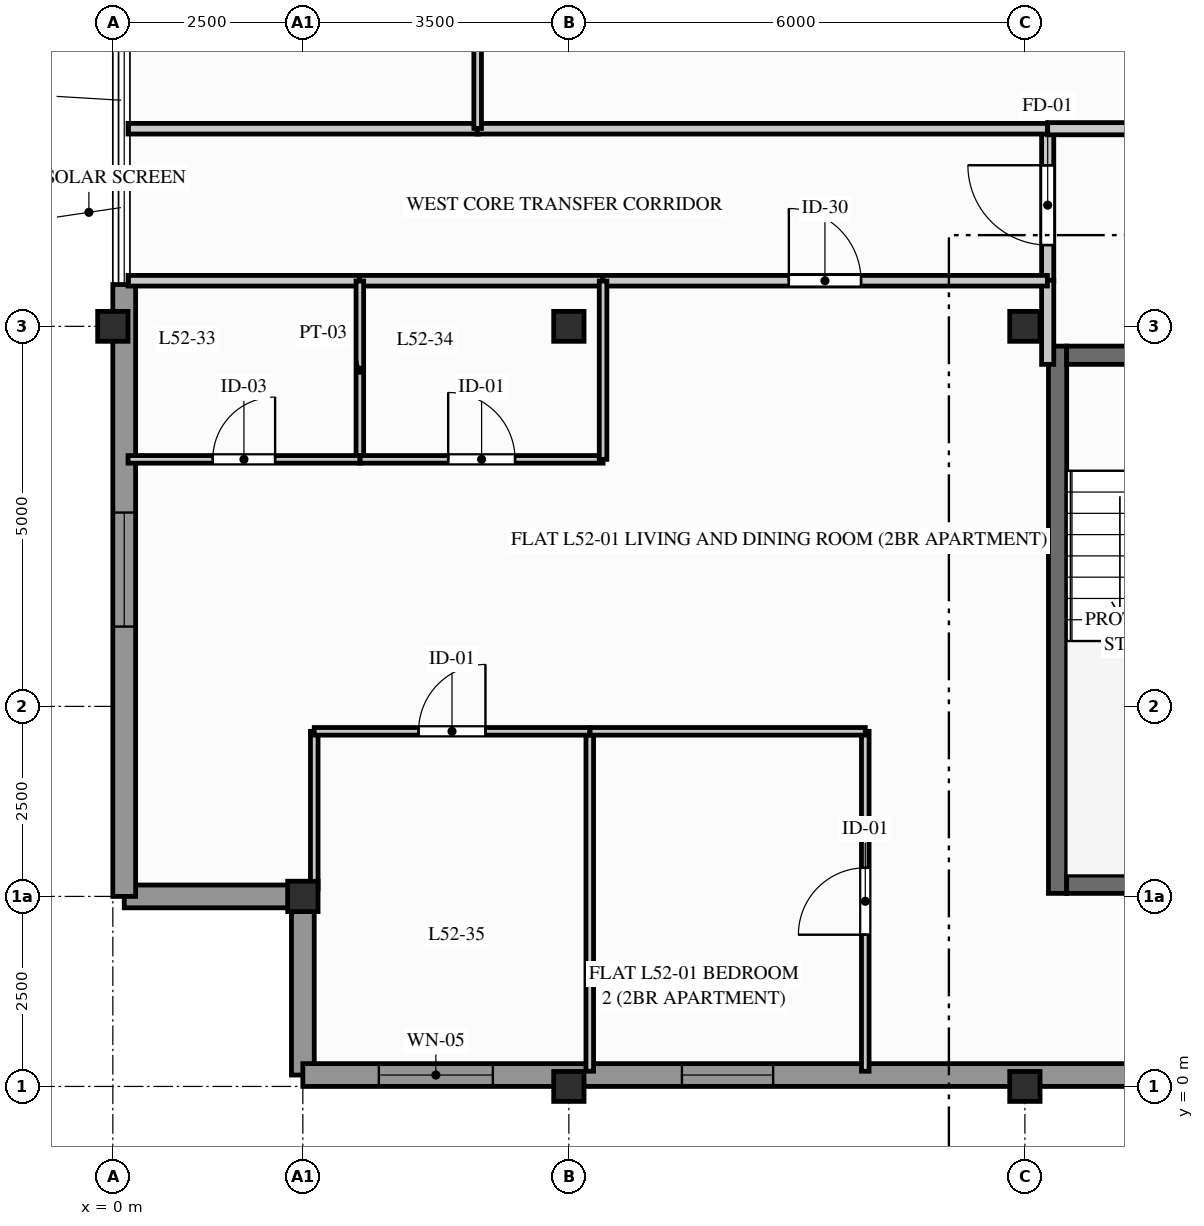
"""IFC4 building model, lengths in metres.
Left out: names, types, materials, properties, quantities, classifications, styles, units other than length and angle.
Written with IfcOpenShell. Run it as: python <this file> out.ifc"""

import sys

from ifc_helpers import new_model, si_unit, direction, frame, frame_2d, origin, origin_2d, place, context, subcontext, project, spatial, rectangle, hollow_rectangle, i_section, extrude, element, fill, save


model = new_model("IFC4")
c1 = context("Model", 3, precision=1e-05, world=origin(), true_north=direction((0.0, 1.0)))
c2 = subcontext(c1, "Body", "Model", "MODEL_VIEW")
j1 = project(units=[si_unit("LENGTHUNIT", "METRE"), si_unit("PLANEANGLEUNIT", "RADIAN")], contexts=[c1])
p1 = place(None, origin())
s1 = spatial("IfcSite", under=j1, at=p1, CompositionType="ELEMENT")
p2 = place(p1, origin())
s2 = spatial("IfcBuilding", under=s1, at=p2, CompositionType="ELEMENT")
p3 = place(p2, frame((0.0, 0.0, 172.8)))
s3 = spatial("IfcBuildingStorey", under=s2, at=p3, CompositionType="ELEMENT", Elevation=172.8)
p4 = place(p3, frame((0.0, 10.0, 0.0), z_axis=(0.0, 0.0, 1.0), x_axis=(1.0, 0.0, 0.0)))
e1 = element("IfcColumn", 1, at=p4, inside=s3, PredefinedType="COLUMN", context=c2, shape_type="SweptSolid", body=[
    extrude(i_section(OverallWidth=0.399, OverallDepth=0.394, WebThickness=0.023, FlangeThickness=0.037, FilletRadius=0.015, at=origin_2d()), origin(), (0.0, 0.0, 1.0), 3.1),
])
p5 = place(p3, frame((2.5, 2.5, 0.0), z_axis=(0.0, 0.0, 1.0), x_axis=(1.0, 0.0, 0.0)))
e2 = element("IfcColumn", 2, at=p5, inside=s3, PredefinedType="COLUMN", context=c2, shape_type="SweptSolid", body=[
    extrude(hollow_rectangle(XDim=0.4, YDim=0.4, WallThickness=0.02, InnerFilletRadius=0.012, OuterFilletRadius=0.024, at=origin_2d()), origin(), (0.0, 0.0, 1.0), 3.1),
])
for number, where, z_axis, x_axis in (
    (3, (6.0, 0.0, 0.0), (0.0, 0.0, 1.0), (1.0, 0.0, 0.0)),
    (4, (6.0, 10.0, 0.0), (0.0, 0.0, 1.0), (1.0, 0.0, 0.0)),
    (5, (12.0, 0.0, 0.0), (0.0, 0.0, 1.0), (1.0, 0.0, 0.0)),
    (6, (12.0, 10.0, 0.0), (0.0, 0.0, 1.0), (1.0, 0.0, 0.0)),
):
    element("IfcColumn", number, at=place(p3, frame(where, z_axis=z_axis, x_axis=x_axis)), inside=s3, PredefinedType="COLUMN", context=c2, shape_type="SweptSolid", body=[
        extrude(i_section(OverallWidth=0.399, OverallDepth=0.394, WebThickness=0.023, FlangeThickness=0.037, FilletRadius=0.015, at=origin_2d()), origin(), (0.0, 0.0, 1.0), 3.1),
    ])
for number, where, z_axis, x_axis in (
    (7, (2.5, 2.5, 0.0), (0.0, 0.0, 1.0), (0.0, -1.0, 0.0)),
    (8, (0.15, 2.5, 0.0), (0.0, 0.0, 1.0), (1.0, 0.0, 0.0)),
):
    element("IfcWall", number, at=place(p3, frame(where, z_axis=z_axis, x_axis=x_axis)), inside=s3, PredefinedType="STANDARD", context=c2, shape_type="SweptSolid", body=[
        extrude(rectangle(XDim=2.35, YDim=0.3, at=frame_2d((1.175, 0.0))), origin(), (0.0, 0.0, 1.0), 2.89),
    ])
p6 = place(p3, frame((2.5, 0.15, 0.0), z_axis=(0.0, 0.0, 1.0), x_axis=(1.0, 0.0, 0.0)))
e9 = element("IfcWall", 9, at=p6, inside=s3, PredefinedType="STANDARD", context=c2, shape_type="SweptSolid", body=[
    extrude(rectangle(XDim=55.0, YDim=0.3, at=frame_2d((27.5, 0.0))), origin(), (0.0, 0.0, 1.0), 2.332),
])
p7 = place(p6, frame((1.0, 0.0, 0.312)))
e10 = element("IfcOpeningElement", 10, at=p7, cuts=e9, PredefinedType="OPENING", context=c2, shape_type="SweptSolid", body=[
    extrude(rectangle(XDim=1.5, YDim=1.8, at=frame_2d((0.75, 0.9))), frame((0.0, 0.16, 0.0), z_axis=(0.0, -1.0, 0.0), x_axis=(1.0, 0.0, 0.0)), (0.0, 0.0, 1.0), 0.32),
])
p8 = place(p6, frame((24.5, 0.0, 1.15)))
e11 = element("IfcOpeningElement", 11, at=p8, cuts=e9, PredefinedType="OPENING", context=c2, shape_type="SweptSolid", body=[
    extrude(rectangle(XDim=0.9, YDim=0.9, at=frame_2d((0.45, 0.45))), frame((0.0, 0.16, 0.0), z_axis=(0.0, -1.0, 0.0), x_axis=(1.0, 0.0, 0.0)), (0.0, 0.0, 1.0), 0.32),
])
p9 = place(p6, frame((47.2, 0.0, 0.512)))
e12 = element("IfcOpeningElement", 12, at=p9, cuts=e9, PredefinedType="OPENING", context=c2, shape_type="SweptSolid", body=[
    extrude(rectangle(XDim=1.2, YDim=1.6, at=frame_2d((0.6, 0.8))), frame((0.0, 0.16, 0.0), z_axis=(0.0, -1.0, 0.0), x_axis=(1.0, 0.0, 0.0)), (0.0, 0.0, 1.0), 0.32),
])
p10 = place(p6, frame((52.3, 0.0, 0.512)))
e13 = element("IfcOpeningElement", 13, at=p10, cuts=e9, PredefinedType="OPENING", context=c2, shape_type="SweptSolid", body=[
    extrude(rectangle(XDim=1.2, YDim=1.6, at=frame_2d((0.6, 0.8))), frame((0.0, 0.16, 0.0), z_axis=(0.0, -1.0, 0.0), x_axis=(1.0, 0.0, 0.0)), (0.0, 0.0, 1.0), 0.32),
])
p11 = place(p6, frame((4.988, 0.0, 0.512)))
e14 = element("IfcOpeningElement", 14, at=p11, cuts=e9, PredefinedType="OPENING", context=c2, shape_type="SweptSolid", body=[
    extrude(rectangle(XDim=1.2, YDim=1.6, at=frame_2d((0.6, 0.8))), frame((0.0, 0.16, 0.0), z_axis=(0.0, -1.0, 0.0), x_axis=(1.0, 0.0, 0.0)), (0.0, 0.0, 1.0), 0.32),
])
p12 = place(p3, frame((0.15, 10.55, 0.0), z_axis=(0.0, 0.0, 1.0), x_axis=(0.0, -1.0, 0.0)))
e15 = element("IfcWall", 15, at=p12, inside=s3, PredefinedType="STANDARD", context=c2, shape_type="SweptSolid", body=[
    extrude(rectangle(XDim=8.05, YDim=0.3, at=frame_2d((4.025, 0.0))), origin(), (0.0, 0.0, 1.0), 2.89),
])
p13 = place(p12, frame((3.0, 0.0, 0.87)))
e16 = element("IfcOpeningElement", 16, at=p13, cuts=e15, PredefinedType="OPENING", context=c2, shape_type="SweptSolid", body=[
    extrude(rectangle(XDim=1.5, YDim=1.8, at=frame_2d((0.75, 0.9))), frame((0.0, 0.16, 0.0), z_axis=(0.0, -1.0, 0.0), x_axis=(1.0, 0.0, 0.0)), (0.0, 0.0, 1.0), 0.32),
])
p14 = place(p3, frame((12.43, 2.54, 0.0), z_axis=(0.0, 0.0, 1.0), x_axis=(0.0, 1.0, 0.0)))
e17 = element("IfcWall", 17, at=p14, inside=s3, PredefinedType="SHEAR", context=c2, shape_type="SweptSolid", body=[
    extrude(rectangle(XDim=7.2, YDim=0.24, at=frame_2d((3.6, 0.0))), origin(), (0.0, 0.0, 1.0), 2.89),
])
p15 = place(p3, frame((12.55, 2.66, 0.0), z_axis=(0.0, 0.0, 1.0), x_axis=(1.0, 0.0, 0.0)))
e18 = element("IfcWall", 18, at=p15, inside=s3, PredefinedType="SHEAR", context=c2, shape_type="SweptSolid", body=[
    extrude(rectangle(XDim=2.95, YDim=0.24, at=frame_2d((1.475, 0.0))), origin(), (0.0, 0.0, 1.0), 2.89),
])
p16 = place(p3, frame((15.5, 9.62, 0.0), z_axis=(0.0, 0.0, 1.0), x_axis=(-1.0, 0.0, 0.0)))
e19 = element("IfcWall", 19, at=p16, inside=s3, PredefinedType="SHEAR", context=c2, shape_type="SweptSolid", body=[
    extrude(rectangle(XDim=2.95, YDim=0.24, at=frame_2d((1.475, 0.0))), origin(), (0.0, 0.0, 1.0), 2.89),
])
p17 = place(p16, frame((0.95, 0.0, 0.0)))
e20 = element("IfcOpeningElement", 20, at=p17, cuts=e19, PredefinedType="OPENING", context=c2, shape_type="SweptSolid", body=[
    extrude(rectangle(XDim=1.05, YDim=2.06, at=frame_2d((0.525, 1.03))), frame((0.0, 0.13, 0.0), z_axis=(0.0, -1.0, 0.0), x_axis=(1.0, 0.0, 0.0)), (0.0, 0.0, 1.0), 0.26),
])
p18 = place(p3, frame((12.3, 10.589, 0.0), z_axis=(0.0, 0.0, 1.0), x_axis=(0.0, 1.0, 0.0)))
e21 = element("IfcWall", 21, at=p18, inside=s3, PredefinedType="PARTITIONING", context=c2, shape_type="SweptSolid", body=[
    extrude(rectangle(XDim=2.011, YDim=0.16, at=frame_2d((1.006, 0.0))), origin(), (0.0, 0.0, 1.0), 2.89),
])
p19 = place(p18, frame((0.481, 0.0, 0.0)))
e22 = element("IfcOpeningElement", 22, at=p19, cuts=e21, PredefinedType="OPENING", context=c2, shape_type="SweptSolid", body=[
    extrude(rectangle(XDim=1.05, YDim=2.06, at=frame_2d((0.525, 1.03))), frame((0.0, 0.09, 0.0), z_axis=(0.0, -1.0, 0.0), x_axis=(1.0, 0.0, 0.0)), (0.0, 0.0, 1.0), 0.18),
])
p20 = place(p3, frame((12.3, 9.5, 0.0), z_axis=(0.0, 0.0, 1.0), x_axis=(0.0, 1.0, 0.0)))
e23 = element("IfcWall", 23, at=p20, inside=s3, PredefinedType="PARTITIONING", context=c2, shape_type="SweptSolid", body=[
    extrude(rectangle(XDim=1.107, YDim=0.16, at=frame_2d((0.554, 0.0))), origin(), (0.0, 0.0, 1.0), 2.253),
])
p21 = place(p3, frame((12.3, 12.6, 0.0), z_axis=(0.0, 0.0, 1.0), x_axis=(1.0, 0.0, 0.0)))
e24 = element("IfcWall", 24, at=p21, inside=s3, PredefinedType="PARTITIONING", context=c2, shape_type="SweptSolid", body=[
    extrude(rectangle(XDim=3.307, YDim=0.16, at=frame_2d((1.654, 0.0))), origin(), (0.0, 0.0, 1.0), 2.89),
])
p22 = place(p3, frame((0.2, 10.6, 0.0), z_axis=(0.0, 0.0, 1.0), x_axis=(1.0, 0.0, 0.0)))
e25 = element("IfcWall", 25, at=p22, inside=s3, PredefinedType="PARTITIONING", context=c2, shape_type="SweptSolid", body=[
    extrude(rectangle(XDim=3.061, YDim=0.14, at=frame_2d((1.531, 0.0))), origin(), (0.0, 0.0, 1.0), 2.89),
])
p23 = place(p3, frame((3.243, 10.6, 0.0), z_axis=(0.0, 0.0, 1.0), x_axis=(1.0, 0.0, 0.0)))
e26 = element("IfcWall", 26, at=p23, inside=s3, PredefinedType="PARTITIONING", context=c2, shape_type="SweptSolid", body=[
    extrude(rectangle(XDim=3.219, YDim=0.14, at=frame_2d((1.609, 0.0))), origin(), (0.0, 0.0, 1.0), 2.253),
])
p24 = place(p3, frame((6.443, 10.6, 0.0), z_axis=(0.0, 0.0, 1.0), x_axis=(1.0, 0.0, 0.0)))
e27 = element("IfcWall", 27, at=p24, inside=s3, PredefinedType="PARTITIONING", context=c2, shape_type="SweptSolid", body=[
    extrude(rectangle(XDim=5.853, YDim=0.14, at=frame_2d((2.927, 0.0))), origin(), (0.0, 0.0, 1.0), 2.253),
])
p25 = place(p24, frame((2.452, 0.0, 0.0)))
e28 = element("IfcOpeningElement", 28, at=p25, cuts=e27, PredefinedType="OPENING", context=c2, shape_type="SweptSolid", body=[
    extrude(rectangle(XDim=0.95, YDim=2.05, at=frame_2d((0.475, 1.025))), frame((0.0, 0.08, 0.0), z_axis=(0.0, -1.0, 0.0), x_axis=(1.0, 0.0, 0.0)), (0.0, 0.0, 1.0), 0.16),
])
p26 = place(p3, frame((0.2, 12.6, 0.0), z_axis=(0.0, 0.0, 1.0), x_axis=(1.0, 0.0, 0.0)))
e29 = element("IfcWall", 29, at=p26, inside=s3, PredefinedType="PARTITIONING", context=c2, shape_type="SweptSolid", body=[
    extrude(rectangle(XDim=4.611, YDim=0.14, at=frame_2d((2.306, 0.0))), origin(), (0.0, 0.0, 1.0), 2.89),
])
p27 = place(p3, frame((4.793, 12.6, 0.0), z_axis=(0.0, 0.0, 1.0), x_axis=(1.0, 0.0, 0.0)))
e30 = element("IfcWall", 30, at=p27, inside=s3, PredefinedType="PARTITIONING", context=c2, shape_type="SweptSolid", body=[
    extrude(rectangle(XDim=7.503, YDim=0.14, at=frame_2d((3.751, 0.0))), origin(), (0.0, 0.0, 1.0), 2.253),
])
p28 = place(p3, frame((3.25, 8.25, 0.0), z_axis=(0.0, 0.0, 1.0), x_axis=(0.0, 1.0, 0.0)))
e31 = element("IfcWall", 31, at=p28, inside=s3, PredefinedType="PARTITIONING", context=c2, shape_type="SweptSolid", body=[
    extrude(rectangle(XDim=2.346, YDim=0.1, at=frame_2d((1.173, 0.0))), origin(), (0.0, 0.0, 1.0), 2.253),
])
p29 = place(p3, frame((0.2, 8.25, 0.0), z_axis=(0.0, 0.0, 1.0), x_axis=(1.0, 0.0, 0.0)))
e32 = element("IfcWall", 32, at=p29, inside=s3, PredefinedType="PARTITIONING", context=c2, shape_type="SweptSolid", body=[
    extrude(rectangle(XDim=3.05, YDim=0.1, at=frame_2d((1.525, 0.0))), origin(), (0.0, 0.0, 1.0), 2.89),
])
p30 = place(p29, frame((1.115, 0.0, 0.0)))
e33 = element("IfcOpeningElement", 33, at=p30, cuts=e32, PredefinedType="OPENING", context=c2, shape_type="SweptSolid", body=[
    extrude(rectangle(XDim=0.82, YDim=2.02, at=frame_2d((0.41, 1.01))), frame((0.0, 0.06, 0.0), z_axis=(0.0, -1.0, 0.0), x_axis=(1.0, 0.0, 0.0)), (0.0, 0.0, 1.0), 0.12),
])
p31 = place(p3, frame((3.254, 8.25, 0.0), z_axis=(0.0, 0.0, 1.0), x_axis=(1.0, 0.0, 0.0)))
e34 = element("IfcWall", 34, at=p31, inside=s3, PredefinedType="PARTITIONING", context=c2, shape_type="SweptSolid", body=[
    extrude(rectangle(XDim=3.196, YDim=0.1, at=frame_2d((1.598, 0.0))), origin(), (0.0, 0.0, 1.0), 2.253),
])
p32 = place(p31, frame((1.158, 0.0, 0.0)))
e35 = element("IfcOpeningElement", 35, at=p32, cuts=e34, PredefinedType="OPENING", context=c2, shape_type="SweptSolid", body=[
    extrude(rectangle(XDim=0.88, YDim=2.04, at=frame_2d((0.44, 1.02))), frame((0.0, 0.06, 0.0), z_axis=(0.0, -1.0, 0.0), x_axis=(1.0, 0.0, 0.0)), (0.0, 0.0, 1.0), 0.12),
])
p33 = place(p3, frame((6.45, 8.25, 0.0), z_axis=(0.0, 0.0, 1.0), x_axis=(0.0, 1.0, 0.0)))
e36 = element("IfcWall", 36, at=p33, inside=s3, PredefinedType="PARTITIONING", context=c2, shape_type="SweptSolid", body=[
    extrude(rectangle(XDim=2.346, YDim=0.1, at=frame_2d((1.173, 0.0))), origin(), (0.0, 0.0, 1.0), 2.253),
])
p34 = place(p3, frame((6.275, 0.2, 0.0), z_axis=(0.0, 0.0, 1.0), x_axis=(0.0, 1.0, 0.0)))
e37 = element("IfcWall", 37, at=p34, inside=s3, PredefinedType="PARTITIONING", context=c2, shape_type="SweptSolid", body=[
    extrude(rectangle(XDim=4.472, YDim=0.1, at=frame_2d((2.236, 0.0))), origin(), (0.0, 0.0, 1.0), 2.89),
])
p35 = place(p3, frame((2.65, 2.599, 0.0), z_axis=(0.0, 0.0, 1.0), x_axis=(0.0, 1.0, 0.0)))
e38 = element("IfcWall", 38, at=p35, inside=s3, PredefinedType="PARTITIONING", context=c2, shape_type="SweptSolid", body=[
    extrude(rectangle(XDim=2.073, YDim=0.1, at=frame_2d((1.036, 0.0))), origin(), (0.0, 0.0, 1.0), 2.89),
])
p36 = place(p3, frame((2.65, 4.672, 0.0), z_axis=(0.0, 0.0, 1.0), x_axis=(1.0, 0.0, 0.0)))
e39 = element("IfcWall", 39, at=p36, inside=s3, PredefinedType="PARTITIONING", context=c2, shape_type="SweptSolid", body=[
    extrude(rectangle(XDim=3.625, YDim=0.1, at=frame_2d((1.812, 0.0))), origin(), (0.0, 0.0, 1.0), 2.253),
])
p37 = place(p36, frame((1.373, 0.0, 0.0)))
e40 = element("IfcOpeningElement", 40, at=p37, cuts=e39, PredefinedType="OPENING", context=c2, shape_type="SweptSolid", body=[
    extrude(rectangle(XDim=0.88, YDim=2.04, at=frame_2d((0.44, 1.02))), frame((0.0, 0.06, 0.0), z_axis=(0.0, -1.0, 0.0), x_axis=(1.0, 0.0, 0.0)), (0.0, 0.0, 1.0), 0.12),
])
p38 = place(p3, frame((9.9, 0.2, 0.0), z_axis=(0.0, 0.0, 1.0), x_axis=(0.0, 1.0, 0.0)))
e41 = element("IfcWall", 41, at=p38, inside=s3, PredefinedType="PARTITIONING", context=c2, shape_type="SweptSolid", body=[
    extrude(rectangle(XDim=4.472, YDim=0.1, at=frame_2d((2.236, 0.0))), origin(), (0.0, 0.0, 1.0), 2.89),
])
p39 = place(p38, frame((1.796, 0.0, 0.0)))
e42 = element("IfcOpeningElement", 42, at=p39, cuts=e41, PredefinedType="OPENING", context=c2, shape_type="SweptSolid", body=[
    extrude(rectangle(XDim=0.88, YDim=2.04, at=frame_2d((0.44, 1.02))), frame((0.0, 0.06, 0.0), z_axis=(0.0, -1.0, 0.0), x_axis=(1.0, 0.0, 0.0)), (0.0, 0.0, 1.0), 0.12),
])
p40 = place(p3, frame((6.279, 4.672, 0.0), z_axis=(0.0, 0.0, 1.0), x_axis=(1.0, 0.0, 0.0)))
e43 = element("IfcWall", 43, at=p40, inside=s3, PredefinedType="PARTITIONING", context=c2, shape_type="SweptSolid", body=[
    extrude(rectangle(XDim=3.621, YDim=0.1, at=frame_2d((1.811, 0.0))), origin(), (0.0, 0.0, 1.0), 2.89),
])
p41 = place(p3, frame((4.8, 12.604, 0.0), z_axis=(0.0, 0.0, 1.0), x_axis=(0.0, 1.0, 0.0)))
e44 = element("IfcWall", 44, at=p41, inside=s3, PredefinedType="PARTITIONING", context=c2, shape_type="SweptSolid", body=[
    extrude(rectangle(XDim=4.396, YDim=0.1, at=frame_2d((2.198, 0.0))), origin(), (0.0, 0.0, 1.0), 2.253),
])
p42 = place(p7, origin())
e45 = element("IfcWindow", 45, at=p42, inside=s3, PartitioningType="SINGLE_PANEL", PredefinedType="WINDOW", context=c2, shape_type="SweptSolid", body=[
    extrude(rectangle(XDim=1.5, YDim=1.8, at=frame_2d((0.75, 0.9))), frame((0.0, 0.03, 0.0), z_axis=(0.0, -1.0, 0.0), x_axis=(1.0, 0.0, 0.0)), (0.0, 0.0, 1.0), 0.06),
])
fill(e10, e45)
p43 = place(p13, origin())
e46 = element("IfcWindow", 46, at=p43, inside=s3, PartitioningType="SINGLE_PANEL", PredefinedType="WINDOW", context=c2, shape_type="SweptSolid", body=[
    extrude(rectangle(XDim=1.5, YDim=1.8, at=frame_2d((0.75, 0.9))), frame((0.0, 0.03, 0.0), z_axis=(0.0, -1.0, 0.0), x_axis=(1.0, 0.0, 0.0)), (0.0, 0.0, 1.0), 0.06),
])
fill(e16, e46)
p44 = place(p19, origin())
e47 = element("IfcDoor", 47, at=p44, inside=s3, OperationType="SINGLE_SWING_RIGHT", PredefinedType="DOOR", context=c2, shape_type="SweptSolid", body=[
    extrude(rectangle(XDim=1.05, YDim=2.06, at=frame_2d((0.525, 1.03))), frame((0.0, 0.025, 0.0), z_axis=(0.0, -1.0, 0.0), x_axis=(1.0, 0.0, 0.0)), (0.0, 0.0, 1.0), 0.05),
])
fill(e22, e47)
p45 = place(p25, origin())
e48 = element("IfcDoor", 48, at=p45, inside=s3, OperationType="SINGLE_SWING_LEFT", PredefinedType="DOOR", context=c2, shape_type="SweptSolid", body=[
    extrude(rectangle(XDim=0.95, YDim=2.05, at=frame_2d((0.475, 1.025))), frame((0.0, 0.025, 0.0), z_axis=(0.0, -1.0, 0.0), x_axis=(1.0, 0.0, 0.0)), (0.0, 0.0, 1.0), 0.05),
])
fill(e28, e48)
p46 = place(p30, origin())
e49 = element("IfcDoor", 49, at=p46, inside=s3, OperationType="SINGLE_SWING_RIGHT", PredefinedType="DOOR", context=c2, shape_type="SweptSolid", body=[
    extrude(rectangle(XDim=0.82, YDim=2.02, at=frame_2d((0.41, 1.01))), frame((0.0, 0.025, 0.0), z_axis=(0.0, -1.0, 0.0), x_axis=(1.0, 0.0, 0.0)), (0.0, 0.0, 1.0), 0.05),
])
fill(e33, e49)
p47 = place(p32, origin())
e50 = element("IfcDoor", 50, at=p47, inside=s3, OperationType="SINGLE_SWING_LEFT", PredefinedType="DOOR", context=c2, shape_type="SweptSolid", body=[
    extrude(rectangle(XDim=0.88, YDim=2.04, at=frame_2d((0.44, 1.02))), frame((0.0, 0.025, 0.0), z_axis=(0.0, -1.0, 0.0), x_axis=(1.0, 0.0, 0.0)), (0.0, 0.0, 1.0), 0.05),
])
fill(e35, e50)
p48 = place(p37, origin())
e51 = element("IfcDoor", 51, at=p48, inside=s3, OperationType="SINGLE_SWING_RIGHT", PredefinedType="DOOR", context=c2, shape_type="SweptSolid", body=[
    extrude(rectangle(XDim=0.88, YDim=2.04, at=frame_2d((0.44, 1.02))), frame((0.0, 0.025, 0.0), z_axis=(0.0, -1.0, 0.0), x_axis=(1.0, 0.0, 0.0)), (0.0, 0.0, 1.0), 0.05),
])
fill(e40, e51)
p49 = place(p39, origin())
e52 = element("IfcDoor", 52, at=p49, inside=s3, OperationType="SINGLE_SWING_LEFT", PredefinedType="DOOR", context=c2, shape_type="SweptSolid", body=[
    extrude(rectangle(XDim=0.88, YDim=2.04, at=frame_2d((0.44, 1.02))), frame((0.0, 0.025, 0.0), z_axis=(0.0, -1.0, 0.0), x_axis=(1.0, 0.0, 0.0)), (0.0, 0.0, 1.0), 0.05),
])
fill(e42, e52)
p50 = place(p11, origin())
e53 = element("IfcWindow", 53, at=p50, inside=s3, PartitioningType="SINGLE_PANEL", PredefinedType="WINDOW", context=c2, shape_type="SweptSolid", body=[
    extrude(rectangle(XDim=1.2, YDim=1.6, at=frame_2d((0.6, 0.8))), frame((0.0, 0.03, 0.0), z_axis=(0.0, -1.0, 0.0), x_axis=(1.0, 0.0, 0.0)), (0.0, 0.0, 1.0), 0.06),
])
fill(e14, e53)
save(model, sys.argv[1])
